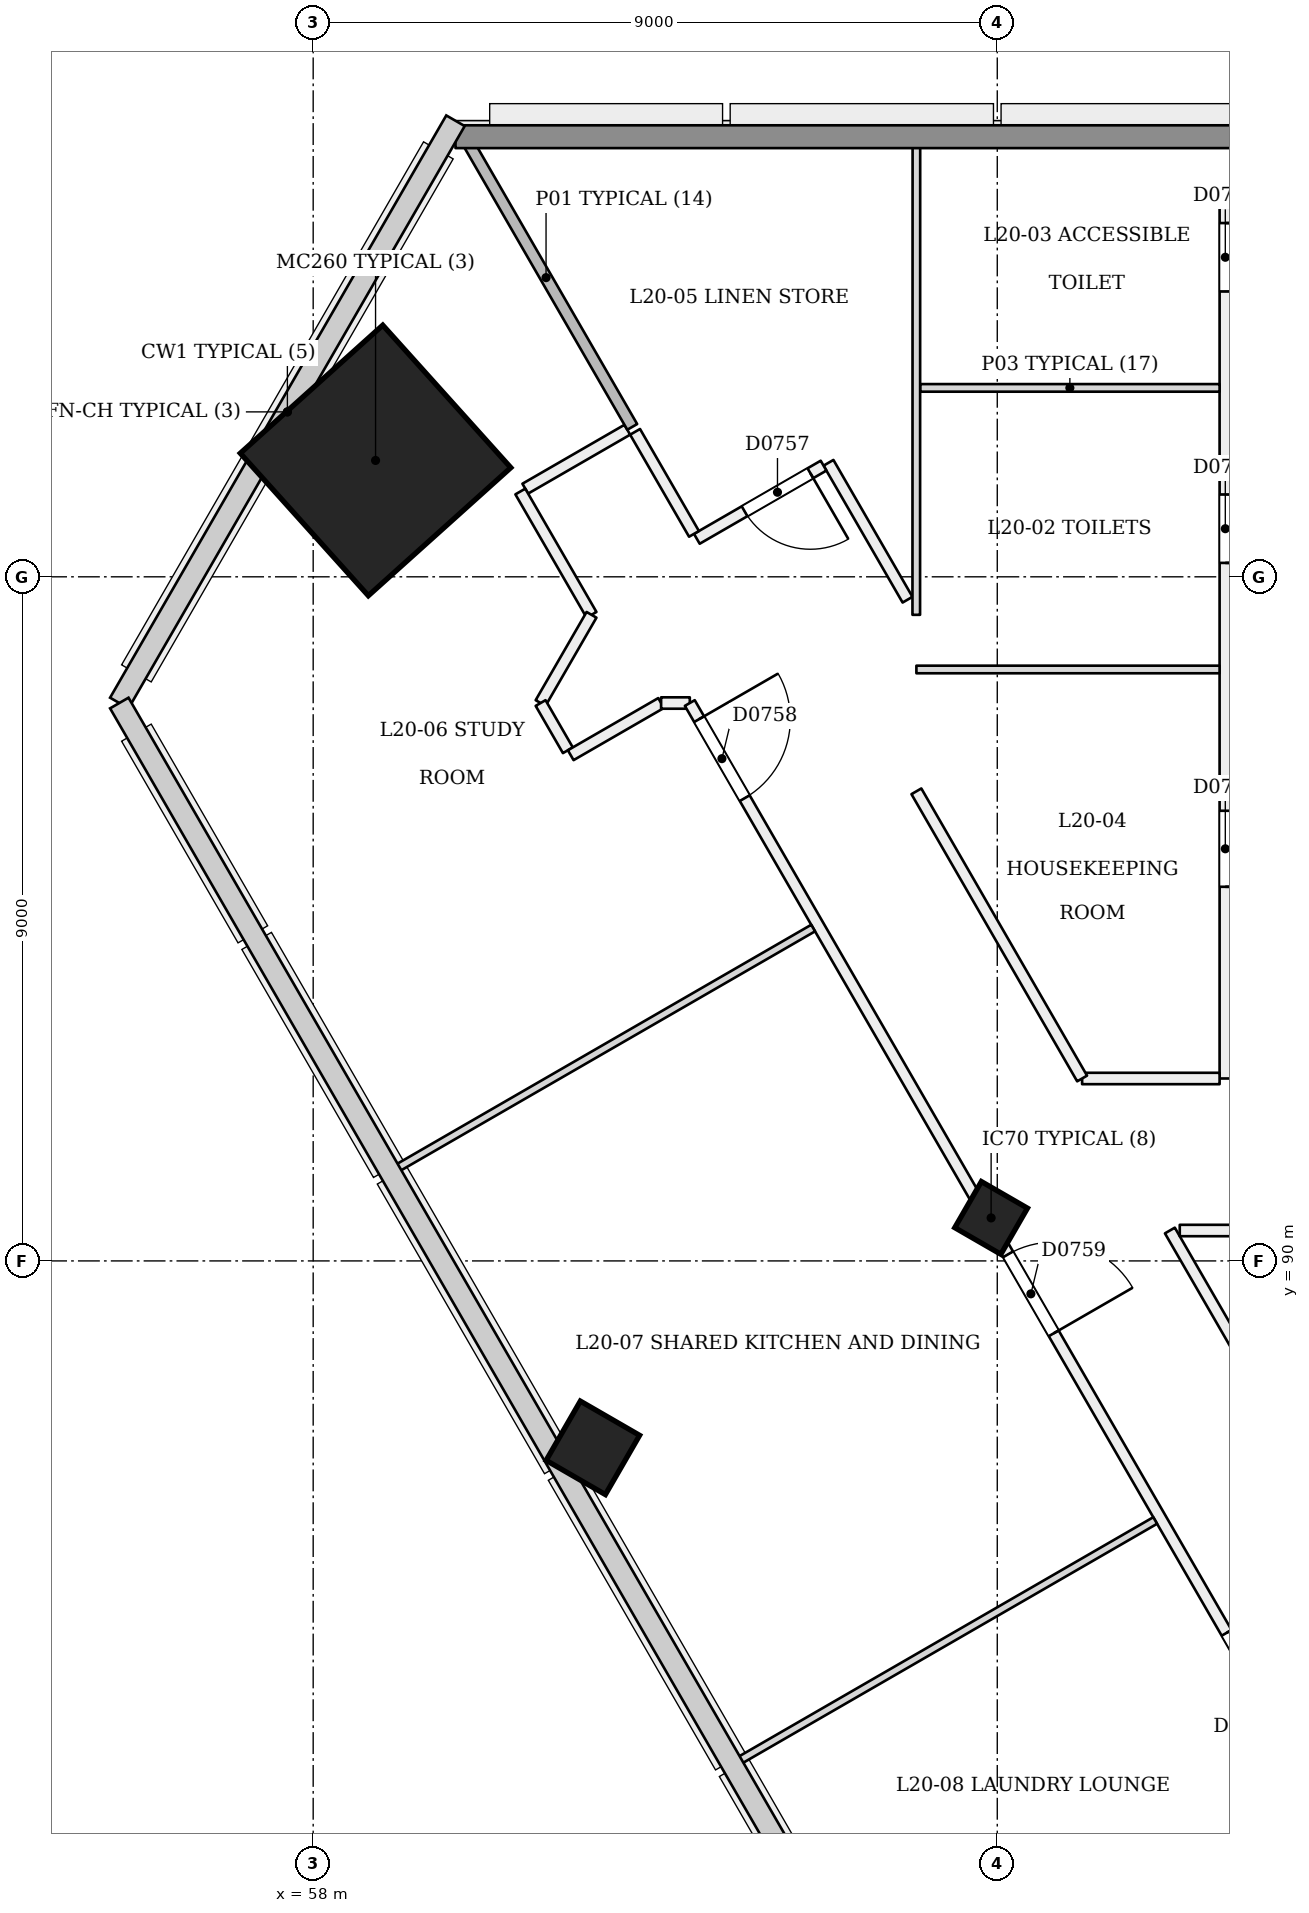
"""IFC4 building model, lengths in metres.
Left out: names, types, materials, properties, quantities, classifications, styles, units other than length and angle.
Written with IfcOpenShell. Run it as: python <this file> out.ifc"""

import sys

from ifc_helpers import new_model, si_unit, direction, frame, frame_2d, origin, origin_2d, place, context, subcontext, project, spatial, rectangle, extrude, element, fill, save


model = new_model("IFC4")
c1 = context("Model", 3, precision=1e-05, world=origin(), true_north=direction((0.0, 1.0)))
c2 = subcontext(c1, "Body", "Model", "MODEL_VIEW")
j1 = project(units=[si_unit("LENGTHUNIT", "METRE"), si_unit("PLANEANGLEUNIT", "RADIAN")], contexts=[c1])
p1 = place(None, origin())
s1 = spatial("IfcSite", under=j1, at=p1, CompositionType="ELEMENT")
p2 = place(p1, origin())
s2 = spatial("IfcBuilding", under=s1, at=p2, CompositionType="ELEMENT")
p3 = place(p2, frame((0.0, 0.0, 81.0)))
s3 = spatial("IfcBuildingStorey", under=s2, at=p3, CompositionType="ELEMENT", Elevation=81.0)
p4 = place(p3, frame((66.892, 90.519, -0.021), z_axis=(0.02215369191, 0.038413282303, 0.999016333038), x_axis=(-0.865361961769, -0.499673789956, 0.038402848257)))
e1 = element("IfcColumn", 1, at=p4, inside=s3, PredefinedType="COLUMN", context=c2, shape_type="SweptSolid", body=[
    extrude(rectangle(XDim=0.7, YDim=0.7, at=origin_2d()), origin(), (0.0, 0.0, 1.0), 3.604),
])
p5 = place(p3, frame((58.787, 100.52, 0.0), z_axis=(0.028334066552, 0.009286524205, 0.999555371723), x_axis=(-0.866555711956, 0.498682221377, 0.019930884529)))
e2 = element("IfcColumn", 2, at=p5, inside=s3, PredefinedType="COLUMN", context=c2, shape_type="SweptSolid", body=[
    extrude(rectangle(XDim=2.52, YDim=2.52, at=origin_2d()), origin(), (0.0, 0.0, 1.0), 3.602),
])
p6 = place(p3, frame((61.652, 87.493, -0.027), z_axis=(0.02222134892, 0.038480872521, 0.999012229206), x_axis=(-0.865639401317, -0.499186837261, 0.038482832442)))
e3 = element("IfcColumn", 3, at=p6, inside=s3, PredefinedType="COLUMN", context=c2, shape_type="SweptSolid", body=[
    extrude(rectangle(XDim=0.9, YDim=0.9, at=origin_2d()), origin(), (0.0, 0.0, 1.0), 3.604),
])
p7 = place(p3, frame((70.0, 103.9, 0.0), z_axis=(0.0, 0.0, 1.0), x_axis=(0.0, -1.0, 0.0)))
e4 = element("IfcWall", 4, at=p7, inside=s3, PredefinedType="PARTITIONING", context=c2, shape_type="SweptSolid", body=[
    extrude(rectangle(XDim=11.5, YDim=0.15, at=frame_2d((5.75, 0.0))), origin(), (0.0, 0.0, 1.0), 2.6),
])
p8 = place(p7, frame((3.817, 0.0, 0.0)))
e5 = element("IfcOpeningElement", 5, at=p8, cuts=e4, PredefinedType="OPENING", context=c2, shape_type="SweptSolid", body=[
    extrude(rectangle(XDim=0.9, YDim=2.1, at=frame_2d((0.45, 1.05))), frame((0.0, 0.085, 0.0), z_axis=(0.0, -1.0, 0.0), x_axis=(1.0, 0.0, 0.0)), (0.0, 0.0, 1.0), 0.171),
])
p9 = place(p7, frame((0.246, 0.0, 0.0)))
e6 = element("IfcOpeningElement", 6, at=p9, cuts=e4, PredefinedType="OPENING", context=c2, shape_type="SweptSolid", body=[
    extrude(rectangle(XDim=0.9, YDim=2.1, at=frame_2d((0.45, 1.05))), frame((0.0, 0.085, 0.0), z_axis=(0.0, -1.0, 0.0), x_axis=(1.0, 0.0, 0.0)), (0.0, 0.0, 1.0), 0.171),
])
p10 = place(p7, frame((7.978, 0.0, 0.0)))
e7 = element("IfcOpeningElement", 7, at=p10, cuts=e4, PredefinedType="OPENING", context=c2, shape_type="SweptSolid", body=[
    extrude(rectangle(XDim=1.0, YDim=2.1, at=frame_2d((0.5, 1.05))), frame((0.0, 0.085, 0.0), z_axis=(0.0, -1.0, 0.0), x_axis=(1.0, 0.0, 0.0)), (0.0, 0.0, 1.0), 0.171),
])
p11 = place(p3, frame((69.925, 92.4, 0.0), z_axis=(0.0, 0.0, 1.0), x_axis=(-1.0, 0.0, 0.0)))
e8 = element("IfcWall", 8, at=p11, inside=s3, PredefinedType="PARTITIONING", context=c2, shape_type="SweptSolid", body=[
    extrude(rectangle(XDim=1.809, YDim=0.15, at=frame_2d((0.904, 0.0))), origin(), (0.0, 0.0, 1.0), 3.1),
])
p12 = place(p3, frame((68.116, 92.4, 0.0), z_axis=(0.0, 0.0, 1.0), x_axis=(-0.499787053524, 0.866148313587, 0.0)))
e9 = element("IfcWall", 9, at=p12, inside=s3, PredefinedType="PARTITIONING", context=c2, shape_type="SweptSolid", body=[
    extrude(rectangle(XDim=4.362, YDim=0.15, at=frame_2d((2.181, 0.0))), origin(), (0.0, 0.0, 1.0), 3.1),
])
p13 = place(p3, frame((65.819, 98.699, 0.0), z_axis=(0.0, 0.0, 1.0), x_axis=(-0.499990056298, 0.866031144707, 0.0)))
e10 = element("IfcWall", 10, at=p13, inside=s3, PredefinedType="PARTITIONING", context=c2, shape_type="SweptSolid", body=[
    extrude(rectangle(XDim=2.08, YDim=0.15, at=frame_2d((1.04, 0.0))), origin(), (0.0, 0.0, 1.0), 3.1),
])
p14 = place(p3, frame((64.715, 100.462, 0.0), z_axis=(0.0, 0.0, 1.0), x_axis=(-0.866033512162, -0.499985955615, 0.0)))
e11 = element("IfcWall", 11, at=p14, inside=s3, PredefinedType="PARTITIONING", context=c2, shape_type="SweptSolid", body=[
    extrude(rectangle(XDim=1.925, YDim=0.15, at=frame_2d((0.962, 0.0))), origin(), (0.0, 0.0, 1.0), 3.1),
])
p15 = place(p14, frame((0.2, 0.0, 0.0)))
e12 = element("IfcOpeningElement", 12, at=p15, cuts=e11, PredefinedType="OPENING", context=c2, shape_type="SweptSolid", body=[
    extrude(rectangle(XDim=1.0, YDim=2.1, at=frame_2d((0.5, 1.05))), frame((0.0, 0.085, 0.0), z_axis=(0.0, -1.0, 0.0), x_axis=(1.0, 0.0, 0.0)), (0.0, 0.0, 1.0), 0.171),
])
p16 = place(p3, frame((63.01, 99.565, 0.0), z_axis=(0.0, 0.0, 1.0), x_axis=(-0.499967891604, 0.866043940782, 0.0)))
e13 = element("IfcWall", 13, at=p16, inside=s3, PredefinedType="PARTITIONING", context=c2, shape_type="SweptSolid", body=[
    extrude(rectangle(XDim=1.55, YDim=0.15, at=frame_2d((0.775, 0.0))), origin(), (0.0, 0.0, 1.0), 3.1),
])
p17 = place(p3, frame((62.133, 100.935, 0.0), z_axis=(0.0, 0.0, 1.0), x_axis=(-0.865975732936, -0.500086022567, 0.0)))
e14 = element("IfcWall", 14, at=p17, inside=s3, PredefinedType="PARTITIONING", context=c2, shape_type="SweptSolid", body=[
    extrude(rectangle(XDim=1.55, YDim=0.15, at=frame_2d((0.775, 0.0))), origin(), (0.0, 0.0, 1.0), 3.1),
])
p18 = place(p3, frame((60.725, 100.122, 0.0), z_axis=(0.0, 0.0, 1.0), x_axis=(0.499951854219, -0.86605319898, 0.0)))
e15 = element("IfcWall", 15, at=p18, inside=s3, PredefinedType="PARTITIONING", context=c2, shape_type="SweptSolid", body=[
    extrude(rectangle(XDim=1.873, YDim=0.15, at=frame_2d((0.937, 0.0))), origin(), (0.0, 0.0, 1.0), 3.1),
])
p19 = place(p3, frame((61.662, 98.5, 0.0), z_axis=(0.0, 0.0, 1.0), x_axis=(-0.499980071345, -0.866036909293, 0.0)))
e16 = element("IfcWall", 16, at=p19, inside=s3, PredefinedType="PARTITIONING", context=c2, shape_type="SweptSolid", body=[
    extrude(rectangle(XDim=1.34, YDim=0.15, at=frame_2d((0.67, 0.0))), origin(), (0.0, 0.0, 1.0), 3.1),
])
p20 = place(p3, frame((60.992, 97.34, 0.0), z_axis=(0.0, 0.0, 1.0), x_axis=(0.500016891966, -0.866015650984, 0.0)))
e17 = element("IfcWall", 17, at=p20, inside=s3, PredefinedType="PARTITIONING", context=c2, shape_type="SweptSolid", body=[
    extrude(rectangle(XDim=0.718, YDim=0.15, at=frame_2d((0.359, 0.0))), origin(), (0.0, 0.0, 1.0), 3.1),
])
p21 = place(p3, frame((61.388, 96.653, 0.0), z_axis=(0.0, 0.0, 1.0), x_axis=(0.866046433186, 0.499963574239, 0.0)))
e18 = element("IfcWall", 18, at=p21, inside=s3, PredefinedType="PARTITIONING", context=c2, shape_type="SweptSolid", body=[
    extrude(rectangle(XDim=1.373, YDim=0.15, at=frame_2d((0.687, 0.0))), origin(), (0.0, 0.0, 1.0), 3.1),
])
p22 = place(p3, frame((62.577, 97.34, 0.0), z_axis=(0.0, 0.0, 1.0), x_axis=(1.0, 0.0, 0.0)))
e19 = element("IfcWall", 19, at=p22, inside=s3, PredefinedType="PARTITIONING", context=c2, shape_type="SweptSolid", body=[
    extrude(rectangle(XDim=0.377, YDim=0.15, at=frame_2d((0.189, 0.0))), origin(), (0.0, 0.0, 1.0), 3.1),
])
p23 = place(p3, frame((62.955, 97.34, 0.0), z_axis=(0.0, 0.0, 1.0), x_axis=(0.500000604257, -0.866025054916, 0.0)))
e20 = element("IfcWall", 20, at=p23, inside=s3, PredefinedType="PARTITIONING", context=c2, shape_type="SweptSolid", body=[
    extrude(rectangle(XDim=42.75, YDim=0.15, at=frame_2d((21.375, 0.0))), origin(), (0.0, 0.0, 1.0), 2.7),
])
p24 = place(p23, frame((0.245, 0.0, 0.0)))
e21 = element("IfcOpeningElement", 21, at=p24, cuts=e20, PredefinedType="OPENING", context=c2, shape_type="SweptSolid", body=[
    extrude(rectangle(XDim=1.2, YDim=2.1, at=frame_2d((0.6, 1.05))), frame((0.0, 0.085, 0.0), z_axis=(0.0, -1.0, 0.0), x_axis=(1.0, 0.0, 0.0)), (0.0, 0.0, 1.0), 0.171),
])
p25 = place(p23, frame((8.375, 0.0, 0.0)))
e22 = element("IfcOpeningElement", 22, at=p25, cuts=e20, PredefinedType="OPENING", context=c2, shape_type="SweptSolid", body=[
    extrude(rectangle(XDim=1.2, YDim=2.1, at=frame_2d((0.6, 1.05))), frame((0.0, 0.085, 0.0), z_axis=(0.0, -1.0, 0.0), x_axis=(1.0, 0.0, 0.0)), (0.0, 0.0, 1.0), 0.171),
])
p26 = place(p23, frame((14.125, 0.0, 0.0)))
e23 = element("IfcOpeningElement", 23, at=p26, cuts=e20, PredefinedType="OPENING", context=c2, shape_type="SweptSolid", body=[
    extrude(rectangle(XDim=1.0, YDim=2.1, at=frame_2d((0.5, 1.05))), frame((0.0, 0.085, 0.0), z_axis=(0.0, -1.0, 0.0), x_axis=(1.0, 0.0, 0.0)), (0.0, 0.0, 1.0), 0.171),
])
p27 = place(p23, frame((18.625, 0.0, 0.0)))
e24 = element("IfcOpeningElement", 24, at=p27, cuts=e20, PredefinedType="OPENING", context=c2, shape_type="SweptSolid", body=[
    extrude(rectangle(XDim=1.0, YDim=2.1, at=frame_2d((0.5, 1.05))), frame((0.0, 0.085, 0.0), z_axis=(0.0, -1.0, 0.0), x_axis=(1.0, 0.0, 0.0)), (0.0, 0.0, 1.0), 0.171),
])
p28 = place(p23, frame((26.375, 0.0, 0.0)))
e25 = element("IfcOpeningElement", 25, at=p28, cuts=e20, PredefinedType="OPENING", context=c2, shape_type="SweptSolid", body=[
    extrude(rectangle(XDim=1.2, YDim=2.1, at=frame_2d((0.6, 1.05))), frame((0.0, 0.085, 0.0), z_axis=(0.0, -1.0, 0.0), x_axis=(1.0, 0.0, 0.0)), (0.0, 0.0, 1.0), 0.171),
])
p29 = place(p23, frame((30.946, 0.0, 0.0)))
e26 = element("IfcOpeningElement", 26, at=p29, cuts=e20, PredefinedType="OPENING", context=c2, shape_type="SweptSolid", body=[
    extrude(rectangle(XDim=1.1, YDim=2.1, at=frame_2d((0.55, 1.05))), frame((0.0, 0.085, 0.0), z_axis=(0.0, -1.0, 0.0), x_axis=(1.0, 0.0, 0.0)), (0.0, 0.0, 1.0), 0.171),
])
p30 = place(p23, frame((36.625, 0.0, 0.0)))
e27 = element("IfcOpeningElement", 27, at=p30, cuts=e20, PredefinedType="OPENING", context=c2, shape_type="SweptSolid", body=[
    extrude(rectangle(XDim=1.0, YDim=2.1, at=frame_2d((0.5, 1.05))), frame((0.0, 0.085, 0.0), z_axis=(0.0, -1.0, 0.0), x_axis=(1.0, 0.0, 0.0)), (0.0, 0.0, 1.0), 0.171),
])
p31 = place(p23, frame((41.329, 0.0, 0.0)))
e28 = element("IfcOpeningElement", 28, at=p31, cuts=e20, PredefinedType="OPENING", context=c2, shape_type="SweptSolid", body=[
    extrude(rectangle(XDim=1.2, YDim=2.1, at=frame_2d((0.6, 1.05))), frame((0.0, 0.085, 0.0), z_axis=(0.0, -1.0, 0.0), x_axis=(1.0, 0.0, 0.0)), (0.0, 0.0, 1.0), 0.171),
])
p32 = place(p3, frame((85.0, 63.156, 0.0), z_axis=(0.0, 0.0, 1.0), x_axis=(-0.500000353961, 0.866025199425, 0.0)))
e29 = element("IfcWall", 29, at=p32, inside=s3, PredefinedType="PARTITIONING", context=c2, shape_type="SweptSolid", body=[
    extrude(rectangle(XDim=31.458, YDim=0.15, at=frame_2d((15.729, 0.0))), origin(), (0.0, 0.0, 1.0), 3.1),
])
p33 = place(p32, frame((9.276, 0.0, 0.0)))
e30 = element("IfcOpeningElement", 30, at=p33, cuts=e29, PredefinedType="OPENING", context=c2, shape_type="SweptSolid", body=[
    extrude(rectangle(XDim=1.2, YDim=2.1, at=frame_2d((0.6, 1.05))), frame((0.0, 0.085, 0.0), z_axis=(0.0, -1.0, 0.0), x_axis=(1.0, 0.0, 0.0)), (0.0, 0.0, 1.0), 0.171),
])
p34 = place(p32, frame((18.983, 0.0, 0.0)))
e31 = element("IfcOpeningElement", 31, at=p34, cuts=e29, PredefinedType="OPENING", context=c2, shape_type="SweptSolid", body=[
    extrude(rectangle(XDim=1.2, YDim=2.1, at=frame_2d((0.6, 1.05))), frame((0.0, 0.085, 0.0), z_axis=(0.0, -1.0, 0.0), x_axis=(1.0, 0.0, 0.0)), (0.0, 0.0, 1.0), 0.171),
])
p35 = place(p32, frame((25.783, 0.0, 0.0)))
e32 = element("IfcOpeningElement", 32, at=p35, cuts=e29, PredefinedType="OPENING", context=c2, shape_type="SweptSolid", body=[
    extrude(rectangle(XDim=1.2, YDim=2.1, at=frame_2d((0.6, 1.05))), frame((0.0, 0.085, 0.0), z_axis=(0.0, -1.0, 0.0), x_axis=(1.0, 0.0, 0.0)), (0.0, 0.0, 1.0), 0.171),
])
p36 = place(p3, frame((69.401, 90.4, 0.0), z_axis=(0.0, 0.0, 1.0), x_axis=(1.0, 0.0, 0.0)))
e33 = element("IfcWall", 33, at=p36, inside=s3, PredefinedType="PARTITIONING", context=c2, shape_type="SweptSolid", body=[
    extrude(rectangle(XDim=12.599, YDim=0.15, at=frame_2d((6.3, 0.0))), origin(), (0.0, 0.0, 1.0), 3.1),
])
p37 = place(p3, frame((69.925, 101.486, 0.0), z_axis=(0.0, 0.0, 1.0), x_axis=(-1.0, 0.0, 0.0)))
e34 = element("IfcWall", 34, at=p37, inside=s3, PredefinedType="PARTITIONING", context=c2, shape_type="SweptSolid", body=[
    extrude(rectangle(XDim=3.94, YDim=0.1, at=frame_2d((1.97, 0.0))), origin(), (0.0, 0.0, 1.0), 3.1),
])
p38 = place(p3, frame((65.936, 97.781, 0.0), z_axis=(0.0, 0.0, 1.0), x_axis=(1.0, 0.0, 0.0)))
e35 = element("IfcWall", 35, at=p38, inside=s3, PredefinedType="PARTITIONING", context=c2, shape_type="SweptSolid", body=[
    extrude(rectangle(XDim=3.989, YDim=0.1, at=frame_2d((1.995, 0.0))), origin(), (0.0, 0.0, 1.0), 3.1),
])
p39 = place(p3, frame((65.936, 104.9, 0.0), z_axis=(0.0, 0.0, 1.0), x_axis=(-0.000267032874, -0.999999964347, 0.0)))
e36 = element("IfcWall", 36, at=p39, inside=s3, PredefinedType="PARTITIONING", context=c2, shape_type="SweptSolid", body=[
    extrude(rectangle(XDim=6.4, YDim=0.1, at=frame_2d((3.2, 0.0))), origin(), (0.0, 0.0, 1.0), 2.6),
])
p40 = place(p3, frame((59.93, 104.9, 0.0), z_axis=(0.0, 0.0, 1.0), x_axis=(0.500023773789, -0.866011677546, 0.0)))
e37 = element("IfcWall", 37, at=p40, inside=s3, PredefinedType="PARTITIONING", context=c2, shape_type="SweptSolid", body=[
    extrude(rectangle(XDim=4.535, YDim=0.15, at=frame_2d((2.268, 0.0))), origin(), (0.0, 0.0, 1.0), 2.6),
])
p41 = place(p3, frame((59.083, 91.207, 0.0), z_axis=(0.0, 0.0, 1.0), x_axis=(0.866025401434, 0.500000004071, 0.0)))
e38 = element("IfcWall", 38, at=p41, inside=s3, PredefinedType="PARTITIONING", context=c2, shape_type="SweptSolid", body=[
    extrude(rectangle(XDim=6.345, YDim=0.1, at=frame_2d((3.173, 0.0))), origin(), (0.0, 0.0, 1.0), 2.6),
])
p42 = place(p3, frame((63.583, 83.412, 0.0), z_axis=(0.0, 0.0, 1.0), x_axis=(0.866015781869, 0.500016665277, 0.0)))
e39 = element("IfcWall", 39, at=p42, inside=s3, PredefinedType="PARTITIONING", context=c2, shape_type="SweptSolid", body=[
    extrude(rectangle(XDim=6.345, YDim=0.1, at=frame_2d((3.172, 0.0))), origin(), (0.0, 0.0, 1.0), 2.6),
])
p43 = place(p3, frame((65.85, 79.525, 0.0), z_axis=(0.0, 0.0, 1.0), x_axis=(0.866042250622, 0.499970819286, 0.0)))
e40 = element("IfcWall", 40, at=p43, inside=s3, PredefinedType="PARTITIONING", context=c2, shape_type="SweptSolid", body=[
    extrude(rectangle(XDim=6.325, YDim=0.1, at=frame_2d((3.163, 0.0))), origin(), (0.0, 0.0, 1.0), 2.6),
])
p44 = place(p3, frame((59.872, 104.79, 0.0), z_axis=(0.0, 0.0, 1.0), x_axis=(1.0, 0.0, 0.0)))
e41 = element("IfcWall", 41, at=p44, inside=s3, PredefinedType="SOLIDWALL", context=c2, shape_type="SweptSolid", body=[
    extrude(rectangle(XDim=50.256, YDim=0.3, at=frame_2d((25.128, 0.0))), origin(), (0.0, 0.0, 1.0), 2.6),
])
p45 = place(p8, origin())
e42 = element("IfcDoor", 42, at=p45, inside=s3, OperationType="SINGLE_SWING_RIGHT", PredefinedType="NOTDEFINED", context=c2, shape_type="SweptSolid", body=[
    extrude(rectangle(XDim=0.9, YDim=2.1, at=frame_2d((0.45, 1.05))), frame((0.0, 0.025, 0.0), z_axis=(0.0, -1.0, 0.0), x_axis=(1.0, 0.0, 0.0)), (0.0, 0.0, 1.0), 0.05),
])
fill(e5, e42)
p46 = place(p9, origin())
e43 = element("IfcDoor", 43, at=p46, inside=s3, OperationType="SINGLE_SWING_LEFT", PredefinedType="NOTDEFINED", context=c2, shape_type="SweptSolid", body=[
    extrude(rectangle(XDim=0.9, YDim=2.1, at=frame_2d((0.45, 1.05))), frame((0.0, 0.025, 0.0), z_axis=(0.0, -1.0, 0.0), x_axis=(1.0, 0.0, 0.0)), (0.0, 0.0, 1.0), 0.05),
])
fill(e6, e43)
p47 = place(p10, origin())
e44 = element("IfcDoor", 44, at=p47, inside=s3, OperationType="SINGLE_SWING_RIGHT", PredefinedType="NOTDEFINED", context=c2, shape_type="SweptSolid", body=[
    extrude(rectangle(XDim=1.0, YDim=2.1, at=frame_2d((0.5, 1.05))), frame((0.0, 0.025, 0.0), z_axis=(0.0, -1.0, 0.0), x_axis=(1.0, 0.0, 0.0)), (0.0, 0.0, 1.0), 0.05),
])
fill(e7, e44)
p48 = place(p15, origin())
e45 = element("IfcDoor", 45, at=p48, inside=s3, OperationType="SINGLE_SWING_LEFT", PredefinedType="NOTDEFINED", context=c2, shape_type="SweptSolid", body=[
    extrude(rectangle(XDim=1.0, YDim=2.1, at=frame_2d((0.5, 1.05))), frame((0.0, 0.025, 0.0), z_axis=(0.0, -1.0, 0.0), x_axis=(1.0, 0.0, 0.0)), (0.0, 0.0, 1.0), 0.05),
])
fill(e12, e45)
p49 = place(p24, origin())
e46 = element("IfcDoor", 46, at=p49, inside=s3, OperationType="SINGLE_SWING_LEFT", PredefinedType="NOTDEFINED", context=c2, shape_type="SweptSolid", body=[
    extrude(rectangle(XDim=1.2, YDim=2.1, at=frame_2d((0.6, 1.05))), frame((0.0, 0.025, 0.0), z_axis=(0.0, -1.0, 0.0), x_axis=(1.0, 0.0, 0.0)), (0.0, 0.0, 1.0), 0.05),
])
fill(e21, e46)
p50 = place(p25, origin())
e47 = element("IfcDoor", 47, at=p50, inside=s3, OperationType="SINGLE_SWING_RIGHT", PredefinedType="NOTDEFINED", context=c2, shape_type="SweptSolid", body=[
    extrude(rectangle(XDim=1.2, YDim=2.1, at=frame_2d((0.6, 1.05))), frame((0.0, 0.025, 0.0), z_axis=(0.0, -1.0, 0.0), x_axis=(1.0, 0.0, 0.0)), (0.0, 0.0, 1.0), 0.05),
])
fill(e22, e47)
p51 = place(p26, origin())
e48 = element("IfcDoor", 48, at=p51, inside=s3, OperationType="SINGLE_SWING_LEFT", PredefinedType="NOTDEFINED", context=c2, shape_type="SweptSolid", body=[
    extrude(rectangle(XDim=1.0, YDim=2.1, at=frame_2d((0.5, 1.05))), frame((0.0, 0.025, 0.0), z_axis=(0.0, -1.0, 0.0), x_axis=(1.0, 0.0, 0.0)), (0.0, 0.0, 1.0), 0.05),
])
fill(e23, e48)
save(model, sys.argv[1])
